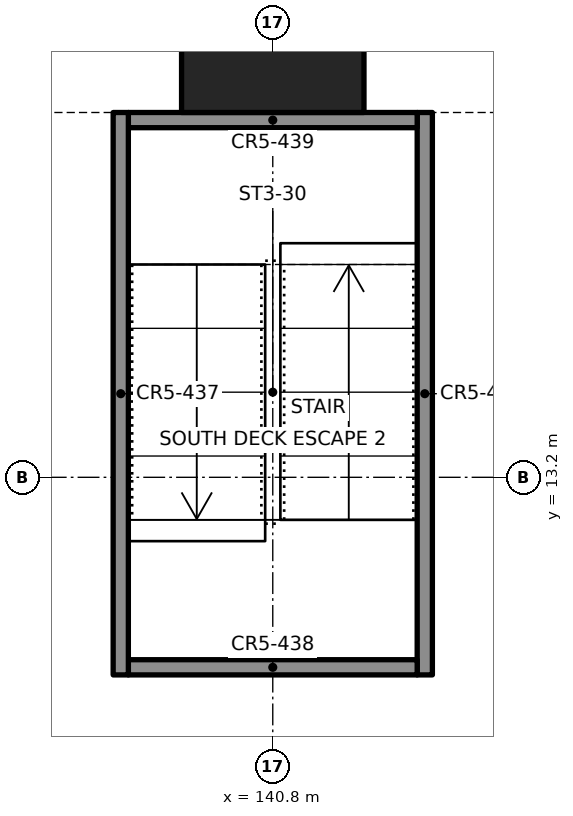
"""IFC4 building model, lengths in metres.
Left out: names, types, materials, properties, quantities, classifications, styles, units other than length and angle.
Written with IfcOpenShell. Run it as: python <this file> out.ifc"""

import sys

from ifc_helpers import new_model, si_unit, direction, frame, frame_2d, origin, origin_2d, place, context, subcontext, project, spatial, rectangle, extrude, element, save


model = new_model("IFC4")
c1 = context("Model", 3, precision=1e-05, world=origin(), true_north=direction((0.0, 1.0)))
c2 = subcontext(c1, "Body", "Model", "MODEL_VIEW")
j1 = project(units=[si_unit("LENGTHUNIT", "METRE"), si_unit("PLANEANGLEUNIT", "RADIAN")], contexts=[c1])
p1 = place(None, origin())
s1 = spatial("IfcSite", under=j1, at=p1, CompositionType="ELEMENT")
p2 = place(p1, origin())
s2 = spatial("IfcBuilding", under=s1, at=p2, CompositionType="ELEMENT")
p3 = place(p2, frame((0.0, 0.0, 4.4)))
s3 = spatial("IfcBuildingStorey", under=s2, at=p3, CompositionType="ELEMENT", Elevation=4.4)
p4 = place(p3, frame((140.8, 19.2, 0.0), z_axis=(0.0, 0.0, 1.0), x_axis=(1.0, 0.0, 0.0)))
e1 = element("IfcColumn", 1, at=p4, inside=s3, PredefinedType="COLUMN", context=c2, shape_type="SweptSolid", body=[
    extrude(rectangle(XDim=2.4, YDim=2.4, at=origin_2d()), origin(), (0.0, 0.0, 1.0), 4.4),
])
for number, where, z_axis, x_axis in (
    (2, (138.8, 10.6, 0.0), (0.0, 0.0, 1.0), (0.0, 1.0, 0.0)),
    (3, (142.8, 18.0, 0.0), (0.0, 0.0, 1.0), (0.0, -1.0, 0.0)),
):
    element("IfcWall", number, at=place(p3, frame(where, z_axis=z_axis, x_axis=x_axis)), inside=s3, PredefinedType="SOLIDWALL", context=c2, shape_type="SweptSolid", body=[
        extrude(rectangle(XDim=7.4, YDim=0.2, at=frame_2d((3.7, 0.0))), origin(), (0.0, 0.0, 1.0), 4.4),
    ])
for number, where, z_axis, x_axis in (
    (4, (138.9, 10.7, 0.0), (0.0, 0.0, 1.0), (1.0, 0.0, 0.0)),
    (5, (138.9, 17.9, 0.0), (0.0, 0.0, 1.0), (1.0, 0.0, 0.0)),
):
    element("IfcWall", number, at=place(p3, frame(where, z_axis=z_axis, x_axis=x_axis)), inside=s3, PredefinedType="SOLIDWALL", context=c2, shape_type="SweptSolid", body=[
        extrude(rectangle(XDim=3.8, YDim=0.2, at=frame_2d((1.9, 0.0))), origin(), (0.0, 0.0, 1.0), 4.4),
    ])
save(model, sys.argv[1])
